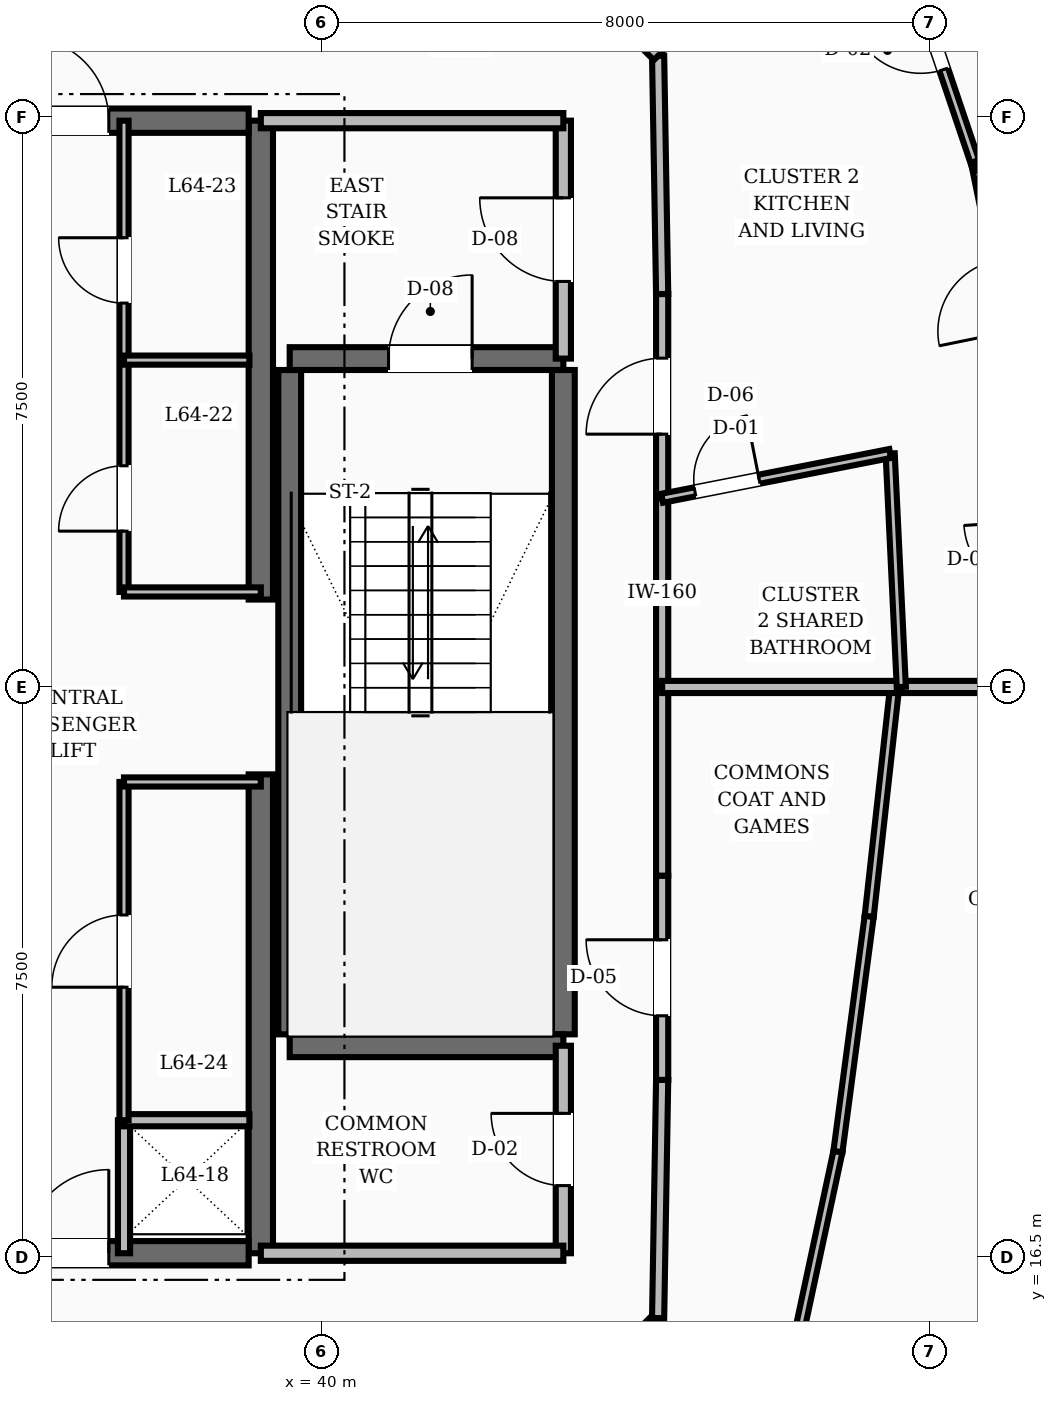
"""IFC4 building model, lengths in metres.
Left out: names, types, materials, properties, quantities, classifications, styles, units other than length and angle.
Written with IfcOpenShell. Run it as: python <this file> out.ifc"""

import sys

from ifc_helpers import new_model, si_unit, direction, frame, frame_2d, origin, place, context, subcontext, project, spatial, rectangle, extrude, element, fill, save


model = new_model("IFC4")
c1 = context("Model", 3, precision=1e-05, world=origin(), true_north=direction((0.0, 1.0)))
c2 = subcontext(c1, "Body", "Model", "MODEL_VIEW")
j1 = project(units=[si_unit("LENGTHUNIT", "METRE"), si_unit("PLANEANGLEUNIT", "RADIAN")], contexts=[c1])
p1 = place(None, origin())
s1 = spatial("IfcSite", under=j1, at=p1, CompositionType="ELEMENT")
p2 = place(p1, origin())
s2 = spatial("IfcBuilding", under=s1, at=p2, CompositionType="ELEMENT")
p3 = place(p2, frame((0.0, 0.0, 247.2)))
s3 = spatial("IfcBuildingStorey", under=s2, at=p3, CompositionType="ELEMENT", Elevation=247.2)
for number, where, z_axis, x_axis in (
    (1, (39.2, 16.55, 0.0), (0.0, 0.0, 1.0), (0.0, 1.0, 0.0)),
    (2, (39.2, 25.15, 0.0), (0.0, 0.0, 1.0), (0.0, 1.0, 0.0)),
):
    element("IfcWall", number, at=place(p3, frame(where, z_axis=z_axis, x_axis=x_axis)), inside=s3, PredefinedType="SHEAR", context=c2, shape_type="SweptSolid", body=[
        extrude(rectangle(XDim=6.3, YDim=0.32, at=frame_2d((3.15, 0.0))), origin(), (0.0, 0.0, 1.0), 3.6),
    ])
p4 = place(p3, frame((35.8, 16.55, 0.0), z_axis=(0.0, 0.0, 1.0), x_axis=(1.0, 0.0, 0.0)))
e3 = element("IfcWall", 3, at=p4, inside=s3, PredefinedType="SHEAR", context=c2, shape_type="SweptSolid", body=[
    extrude(rectangle(XDim=3.24, YDim=0.32, at=frame_2d((1.62, 0.0))), origin(), (0.0, 0.0, 1.0), 3.6),
])
p5 = place(p4, frame((0.3, 0.0, 0.0)))
e4 = element("IfcOpeningElement", 4, at=p5, cuts=e3, PredefinedType="OPENING", context=c2, shape_type="SweptSolid", body=[
    extrude(rectangle(XDim=1.1, YDim=2.1, at=frame_2d((0.55, 1.05))), frame((0.0, 0.17, 0.0), z_axis=(0.0, -1.0, 0.0), x_axis=(1.0, 0.0, 0.0)), (0.0, 0.0, 1.0), 0.34),
])
p6 = place(p3, frame((35.8, 31.45, 0.0), z_axis=(0.0, 0.0, 1.0), x_axis=(1.0, 0.0, 0.0)))
e5 = element("IfcWall", 5, at=p6, inside=s3, PredefinedType="SHEAR", context=c2, shape_type="SweptSolid", body=[
    extrude(rectangle(XDim=3.24, YDim=0.32, at=frame_2d((1.62, 0.0))), origin(), (0.0, 0.0, 1.0), 3.6),
])
p7 = place(p6, frame((0.3, 0.0, 0.0)))
e6 = element("IfcOpeningElement", 6, at=p7, cuts=e5, PredefinedType="OPENING", context=c2, shape_type="SweptSolid", body=[
    extrude(rectangle(XDim=1.1, YDim=2.1, at=frame_2d((0.55, 1.05))), frame((0.0, 0.17, 0.0), z_axis=(0.0, -1.0, 0.0), x_axis=(1.0, 0.0, 0.0)), (0.0, 0.0, 1.0), 0.34),
])
for number, where, z_axis, x_axis in (
    (7, (43.18, 19.43, 0.0), (0.0, 0.0, 1.0), (0.0, 1.0, 0.0)),
    (8, (39.58, 19.43, 0.0), (0.0, 0.0, 1.0), (0.0, 1.0, 0.0)),
):
    element("IfcWall", number, at=place(p3, frame(where, z_axis=z_axis, x_axis=x_axis)), inside=s3, PredefinedType="SHEAR", context=c2, shape_type="SweptSolid", body=[
        extrude(rectangle(XDim=8.74, YDim=0.3, at=frame_2d((4.37, 0.0))), origin(), (0.0, 0.0, 1.0), 3.6),
    ])
p8 = place(p3, frame((39.58, 19.28, 0.0), z_axis=(0.0, 0.0, 1.0), x_axis=(1.0, 0.0, 0.0)))
e9 = element("IfcWall", 9, at=p8, inside=s3, PredefinedType="SHEAR", context=c2, shape_type="SweptSolid", body=[
    extrude(rectangle(XDim=3.6, YDim=0.3, at=frame_2d((1.8, 0.0))), origin(), (0.0, 0.0, 1.0), 3.6),
])
p9 = place(p3, frame((39.58, 28.32, 0.0), z_axis=(0.0, 0.0, 1.0), x_axis=(1.0, 0.0, 0.0)))
e10 = element("IfcWall", 10, at=p9, inside=s3, PredefinedType="SHEAR", context=c2, shape_type="SweptSolid", body=[
    extrude(rectangle(XDim=3.6, YDim=0.3, at=frame_2d((1.8, 0.0))), origin(), (0.0, 0.0, 1.0), 3.6),
])
p10 = place(p9, frame((1.3, 0.0, 0.0)))
e11 = element("IfcOpeningElement", 11, at=p10, cuts=e10, PredefinedType="OPENING", context=c2, shape_type="SweptSolid", body=[
    extrude(rectangle(XDim=1.1, YDim=2.1, at=frame_2d((0.55, 1.05))), frame((0.0, 0.16, 0.0), z_axis=(0.0, -1.0, 0.0), x_axis=(1.0, 0.0, 0.0)), (0.0, 0.0, 1.0), 0.32),
])
p11 = place(p3, frame((43.18, 28.32, 0.0), z_axis=(0.0, 0.0, 1.0), x_axis=(0.0, 1.0, 0.0)))
e12 = element("IfcWall", 12, at=p11, inside=s3, PredefinedType="SOLIDWALL", context=c2, shape_type="SweptSolid", body=[
    extrude(rectangle(XDim=3.13, YDim=0.2, at=frame_2d((1.565, 0.0))), origin(), (0.0, 0.0, 1.0), 2.87),
])
p12 = place(p11, frame((1.015, 0.0, 0.0)))
e13 = element("IfcOpeningElement", 13, at=p12, cuts=e12, PredefinedType="OPENING", context=c2, shape_type="SweptSolid", body=[
    extrude(rectangle(XDim=1.1, YDim=2.1, at=frame_2d((0.55, 1.05))), frame((0.0, 0.11, 0.0), z_axis=(0.0, -1.0, 0.0), x_axis=(1.0, 0.0, 0.0)), (0.0, 0.0, 1.0), 0.22),
])
p13 = place(p3, frame((39.2, 31.45, 0.0), z_axis=(0.0, 0.0, 1.0), x_axis=(1.0, 0.0, 0.0)))
e14 = element("IfcWall", 14, at=p13, inside=s3, PredefinedType="SOLIDWALL", context=c2, shape_type="SweptSolid", body=[
    extrude(rectangle(XDim=3.98, YDim=0.2, at=frame_2d((1.99, 0.0))), origin(), (0.0, 0.0, 1.0), 2.87),
])
p14 = place(p3, frame((43.18, 16.55, 0.0), z_axis=(0.0, 0.0, 1.0), x_axis=(0.0, 1.0, 0.0)))
e15 = element("IfcWall", 15, at=p14, inside=s3, PredefinedType="SOLIDWALL", context=c2, shape_type="SweptSolid", body=[
    extrude(rectangle(XDim=2.73, YDim=0.2, at=frame_2d((1.365, 0.0))), origin(), (0.0, 0.0, 1.0), 2.87),
])
p15 = place(p14, frame((0.89, 0.0, 0.0)))
e16 = element("IfcOpeningElement", 16, at=p15, cuts=e15, PredefinedType="OPENING", context=c2, shape_type="SweptSolid", body=[
    extrude(rectangle(XDim=0.95, YDim=2.1, at=frame_2d((0.475, 1.05))), frame((0.0, 0.11, 0.0), z_axis=(0.0, -1.0, 0.0), x_axis=(1.0, 0.0, 0.0)), (0.0, 0.0, 1.0), 0.22),
])
p16 = place(p3, frame((39.2, 16.55, 0.0), z_axis=(0.0, 0.0, 1.0), x_axis=(1.0, 0.0, 0.0)))
e17 = element("IfcWall", 17, at=p16, inside=s3, PredefinedType="SOLIDWALL", context=c2, shape_type="SweptSolid", body=[
    extrude(rectangle(XDim=3.98, YDim=0.2, at=frame_2d((1.99, 0.0))), origin(), (0.0, 0.0, 1.0), 2.87),
])
p17 = place(p3, frame((37.4, 16.55, 0.0), z_axis=(0.0, 0.0, 1.0), x_axis=(0.0, 1.0, 0.0)))
e18 = element("IfcWall", 18, at=p17, inside=s3, PredefinedType="SOLIDWALL", context=c2, shape_type="SweptSolid", body=[
    extrude(rectangle(XDim=1.75, YDim=0.16, at=frame_2d((0.875, 0.0))), origin(), (0.0, 0.0, 1.0), 2.87),
])
p18 = place(p3, frame((37.4, 18.3, 0.0), z_axis=(0.0, 0.0, 1.0), x_axis=(1.0, 0.0, 0.0)))
e19 = element("IfcWall", 19, at=p18, inside=s3, PredefinedType="SOLIDWALL", context=c2, shape_type="SweptSolid", body=[
    extrude(rectangle(XDim=1.65, YDim=0.16, at=frame_2d((0.825, 0.0))), origin(), (0.0, 0.0, 1.0), 2.87),
])
p19 = place(p3, frame((37.4, 25.25, 0.0), z_axis=(0.0, 0.0, 1.0), x_axis=(0.0, 1.0, 0.0)))
e20 = element("IfcWall", 20, at=p19, inside=s3, PredefinedType="PARTITIONING", context=c2, shape_type="SweptSolid", body=[
    extrude(rectangle(XDim=6.2, YDim=0.12, at=frame_2d((3.1, 0.0))), origin(), (0.0, 0.0, 1.0), 2.87),
])
p20 = place(p19, frame((0.8, 0.0, 0.0)))
e21 = element("IfcOpeningElement", 21, at=p20, cuts=e20, PredefinedType="OPENING", context=c2, shape_type="SweptSolid", body=[
    extrude(rectangle(XDim=0.86, YDim=2.1, at=frame_2d((0.43, 1.05))), frame((0.0, 0.07, 0.0), z_axis=(0.0, -1.0, 0.0), x_axis=(1.0, 0.0, 0.0)), (0.0, 0.0, 1.0), 0.14),
])
p21 = place(p19, frame((3.8, 0.0, 0.0)))
e22 = element("IfcOpeningElement", 22, at=p21, cuts=e20, PredefinedType="OPENING", context=c2, shape_type="SweptSolid", body=[
    extrude(rectangle(XDim=0.86, YDim=2.1, at=frame_2d((0.43, 1.05))), frame((0.0, 0.07, 0.0), z_axis=(0.0, -1.0, 0.0), x_axis=(1.0, 0.0, 0.0)), (0.0, 0.0, 1.0), 0.14),
])
p22 = place(p3, frame((37.4, 25.25, 0.0), z_axis=(0.0, 0.0, 1.0), x_axis=(1.0, 0.0, 0.0)))
e23 = element("IfcWall", 23, at=p22, inside=s3, PredefinedType="PARTITIONING", context=c2, shape_type="SweptSolid", body=[
    extrude(rectangle(XDim=1.8, YDim=0.12, at=frame_2d((0.9, 0.0))), origin(), (0.0, 0.0, 1.0), 2.87),
])
p23 = place(p3, frame((37.4, 18.3, 0.0), z_axis=(0.0, 0.0, 1.0), x_axis=(0.0, 1.0, 0.0)))
e24 = element("IfcWall", 24, at=p23, inside=s3, PredefinedType="PARTITIONING", context=c2, shape_type="SweptSolid", body=[
    extrude(rectangle(XDim=4.45, YDim=0.12, at=frame_2d((2.225, 0.0))), origin(), (0.0, 0.0, 1.0), 2.87),
])
p24 = place(p23, frame((1.75, 0.0, 0.0)))
e25 = element("IfcOpeningElement", 25, at=p24, cuts=e24, PredefinedType="OPENING", context=c2, shape_type="SweptSolid", body=[
    extrude(rectangle(XDim=0.95, YDim=2.1, at=frame_2d((0.475, 1.05))), frame((0.0, 0.07, 0.0), z_axis=(0.0, -1.0, 0.0), x_axis=(1.0, 0.0, 0.0)), (0.0, 0.0, 1.0), 0.14),
])
p25 = place(p3, frame((37.4, 22.75, 0.0), z_axis=(0.0, 0.0, 1.0), x_axis=(1.0, 0.0, 0.0)))
e26 = element("IfcWall", 26, at=p25, inside=s3, PredefinedType="PARTITIONING", context=c2, shape_type="SweptSolid", body=[
    extrude(rectangle(XDim=1.8, YDim=0.12, at=frame_2d((0.9, 0.0))), origin(), (0.0, 0.0, 1.0), 2.87),
])
p26 = place(p3, frame((37.4, 28.3, 0.0), z_axis=(0.0, 0.0, 1.0), x_axis=(1.0, 0.0, 0.0)))
e27 = element("IfcWall", 27, at=p26, inside=s3, PredefinedType="PARTITIONING", context=c2, shape_type="SweptSolid", body=[
    extrude(rectangle(XDim=1.65, YDim=0.12, at=frame_2d((0.825, 0.0))), origin(), (0.0, 0.0, 1.0), 2.87),
])
p27 = place(p3, frame((44.48, 24.0, 0.0), z_axis=(0.0, 0.0, 1.0), x_axis=(0.0, 1.0, 0.0)))
e28 = element("IfcWall", 28, at=p27, inside=s3, PredefinedType="SOLIDWALL", context=c2, shape_type="SweptSolid", body=[
    extrude(rectangle(XDim=2.482, YDim=0.16, at=frame_2d((1.241, 0.0))), origin(), (0.0, 0.0, 1.0), 2.87),
])
p28 = place(p3, frame((44.48, 26.482, 0.0), z_axis=(0.0, 0.0, 1.0), x_axis=(0.0, 1.0, 0.0)))
e29 = element("IfcWall", 29, at=p28, inside=s3, PredefinedType="SOLIDWALL", context=c2, shape_type="SweptSolid", body=[
    extrude(rectangle(XDim=2.687, YDim=0.16, at=frame_2d((1.344, 0.0))), origin(), (0.0, 0.0, 1.0), 2.87),
])
p29 = place(p28, frame((0.844, 0.0, 0.0)))
e30 = element("IfcOpeningElement", 30, at=p29, cuts=e29, PredefinedType="OPENING", context=c2, shape_type="SweptSolid", body=[
    extrude(rectangle(XDim=1.0, YDim=2.1, at=frame_2d((0.5, 1.05))), frame((0.0, 0.09, 0.0), z_axis=(0.0, -1.0, 0.0), x_axis=(1.0, 0.0, 0.0)), (0.0, 0.0, 1.0), 0.18),
])
p30 = place(p3, frame((44.48, 29.169, 0.0), z_axis=(0.0, 0.0, 1.0), x_axis=(-0.016981035134, 0.999855811828, 0.0)))
e31 = element("IfcWall", 31, at=p30, inside=s3, PredefinedType="SOLIDWALL", context=c2, shape_type="SweptSolid", body=[
    extrude(rectangle(XDim=3.134, YDim=0.16, at=frame_2d((1.567, 0.0))), origin(), (0.0, 0.0, 1.0), 2.87),
])
for number, where, z_axis, x_axis in (
    (32, (44.427, 32.303, 0.0), (0.0, 0.0, 1.0), (-0.707, 0.707, 0.0)),
    (33, (42.365, 13.635, 0.0), (0.0, 0.0, 1.0), (0.707, 0.707, 0.0)),
):
    element("IfcWall", number, at=place(p3, frame(where, z_axis=z_axis, x_axis=x_axis)), inside=s3, PredefinedType="SOLIDWALL", context=c2, shape_type="SweptSolid", body=[
        extrude(rectangle(XDim=2.916, YDim=0.16, at=frame_2d((1.458, 0.0))), origin(), (0.0, 0.0, 1.0), 2.87),
    ])
p31 = place(p3, frame((44.427, 15.697, 0.0), z_axis=(0.0, 0.0, 1.0), x_axis=(0.016981035134, 0.999855811828, 0.0)))
e34 = element("IfcWall", 34, at=p31, inside=s3, PredefinedType="SOLIDWALL", context=c2, shape_type="SweptSolid", body=[
    extrude(rectangle(XDim=3.134, YDim=0.16, at=frame_2d((1.567, 0.0))), origin(), (0.0, 0.0, 1.0), 2.87),
])
p32 = place(p3, frame((44.48, 18.831, 0.0), z_axis=(0.0, 0.0, 1.0), x_axis=(0.0, 1.0, 0.0)))
e35 = element("IfcWall", 35, at=p32, inside=s3, PredefinedType="SOLIDWALL", context=c2, shape_type="SweptSolid", body=[
    extrude(rectangle(XDim=2.687, YDim=0.16, at=frame_2d((1.344, 0.0))), origin(), (0.0, 0.0, 1.0), 2.87),
])
p33 = place(p32, frame((0.844, 0.0, 0.0)))
e36 = element("IfcOpeningElement", 36, at=p33, cuts=e35, PredefinedType="OPENING", context=c2, shape_type="SweptSolid", body=[
    extrude(rectangle(XDim=1.0, YDim=2.1, at=frame_2d((0.5, 1.05))), frame((0.0, 0.09, 0.0), z_axis=(0.0, -1.0, 0.0), x_axis=(1.0, 0.0, 0.0)), (0.0, 0.0, 1.0), 0.18),
])
p34 = place(p3, frame((44.48, 21.518, 0.0), z_axis=(0.0, 0.0, 1.0), x_axis=(0.0, 1.0, 0.0)))
e37 = element("IfcWall", 37, at=p34, inside=s3, PredefinedType="SOLIDWALL", context=c2, shape_type="SweptSolid", body=[
    extrude(rectangle(XDim=2.482, YDim=0.16, at=frame_2d((1.241, 0.0))), origin(), (0.0, 0.0, 1.0), 2.87),
])
p35 = place(p3, frame((46.09, 14.607, 0.0), z_axis=(0.0, 0.0, 1.0), x_axis=(0.20950424044, 0.977807738381, 0.0)))
e38 = element("IfcWall", 38, at=p35, inside=s3, PredefinedType="PARTITIONING", context=c2, shape_type="SweptSolid", body=[
    extrude(rectangle(XDim=3.355, YDim=0.12, at=frame_2d((1.677, 0.0))), origin(), (0.0, 0.0, 1.0), 2.87),
])
p36 = place(p3, frame((46.792, 17.887, 0.0), z_axis=(0.0, 0.0, 1.0), x_axis=(0.131795047745, 0.991276987219, 0.0)))
e39 = element("IfcWall", 39, at=p36, inside=s3, PredefinedType="PARTITIONING", context=c2, shape_type="SweptSolid", body=[
    extrude(rectangle(XDim=3.123, YDim=0.12, at=frame_2d((1.562, 0.0))), origin(), (0.0, 0.0, 1.0), 2.87),
])
p37 = place(p3, frame((47.204, 20.983, 0.0), z_axis=(0.0, 0.0, 1.0), x_axis=(0.110281438, 0.993900399654, 0.0)))
e40 = element("IfcWall", 40, at=p37, inside=s3, PredefinedType="PARTITIONING", context=c2, shape_type="SweptSolid", body=[
    extrude(rectangle(XDim=3.035, YDim=0.12, at=frame_2d((1.518, 0.0))), origin(), (0.0, 0.0, 1.0), 2.87),
])
p38 = place(p3, frame((44.48, 24.0, 0.0), z_axis=(0.0, 0.0, 1.0), x_axis=(1.0, 0.0, 0.0)))
e41 = element("IfcWall", 41, at=p38, inside=s3, PredefinedType="SOLIDWALL", context=c2, shape_type="SweptSolid", body=[
    extrude(rectangle(XDim=8.69, YDim=0.16, at=frame_2d((4.345, 0.0))), origin(), (0.0, 0.0, 1.0), 2.87),
])
p39 = place(p3, frame((47.626, 24.0, 0.0), z_axis=(0.0, 0.0, 1.0), x_axis=(-0.047719818528, 0.998860760527, 0.0)))
e42 = element("IfcWall", 42, at=p39, inside=s3, PredefinedType="PARTITIONING", context=c2, shape_type="SweptSolid", body=[
    extrude(rectangle(XDim=3.075, YDim=0.12, at=frame_2d((1.537, 0.0))), origin(), (0.0, 0.0, 1.0), 2.87),
])
p40 = place(p3, frame((44.48, 26.482, 0.0), z_axis=(0.0, 0.0, 1.0), x_axis=(0.981268776343, 0.192643682935, 0.0)))
e43 = element("IfcWall", 43, at=p40, inside=s3, PredefinedType="PARTITIONING", context=c2, shape_type="SweptSolid", body=[
    extrude(rectangle(XDim=3.057, YDim=0.12, at=frame_2d((1.528, 0.0))), origin(), (0.0, 0.0, 1.0), 2.87),
])
p41 = place(p40, frame((0.44, 0.0, 0.0)))
e44 = element("IfcOpeningElement", 44, at=p41, cuts=e43, PredefinedType="OPENING", context=c2, shape_type="SweptSolid", body=[
    extrude(rectangle(XDim=0.86, YDim=2.1, at=frame_2d((0.43, 1.05))), frame((0.0, 0.07, 0.0), z_axis=(0.0, -1.0, 0.0), x_axis=(1.0, 0.0, 0.0)), (0.0, 0.0, 1.0), 0.14),
])
p42 = place(p3, frame((49.312, 27.431, 0.0), z_axis=(0.0, 0.0, 1.0), x_axis=(-0.20026371196, 0.979742030165, 0.0)))
e45 = element("IfcWall", 45, at=p42, inside=s3, PredefinedType="PARTITIONING", context=c2, shape_type="SweptSolid", body=[
    extrude(rectangle(XDim=3.496, YDim=0.12, at=frame_2d((1.748, 0.0))), origin(), (0.0, 0.0, 1.0), 2.87),
])
p43 = place(p42, frame((1.273, 0.0, 0.0)))
e46 = element("IfcOpeningElement", 46, at=p43, cuts=e45, PredefinedType="OPENING", context=c2, shape_type="SweptSolid", body=[
    extrude(rectangle(XDim=0.95, YDim=2.1, at=frame_2d((0.475, 1.05))), frame((0.0, 0.07, 0.0), z_axis=(0.0, -1.0, 0.0), x_axis=(1.0, 0.0, 0.0)), (0.0, 0.0, 1.0), 0.14),
])
p44 = place(p3, frame((48.612, 30.857, 0.0), z_axis=(0.0, 0.0, 1.0), x_axis=(-0.320106009533, 0.947381730171, 0.0)))
e47 = element("IfcWall", 47, at=p44, inside=s3, PredefinedType="PARTITIONING", context=c2, shape_type="SweptSolid", body=[
    extrude(rectangle(XDim=3.624, YDim=0.12, at=frame_2d((1.812, 0.0))), origin(), (0.0, 0.0, 1.0), 2.87),
])
p45 = place(p44, frame((1.337, 0.0, 0.0)))
e48 = element("IfcOpeningElement", 48, at=p45, cuts=e47, PredefinedType="OPENING", context=c2, shape_type="SweptSolid", body=[
    extrude(rectangle(XDim=0.95, YDim=2.1, at=frame_2d((0.475, 1.05))), frame((0.0, 0.07, 0.0), z_axis=(0.0, -1.0, 0.0), x_axis=(1.0, 0.0, 0.0)), (0.0, 0.0, 1.0), 0.14),
])
p46 = place(p3, frame((48.612, 30.857, 0.0), z_axis=(0.0, 0.0, 1.0), x_axis=(0.925818055763, 0.377969479752, 0.0)))
e49 = element("IfcWall", 49, at=p46, inside=s3, PredefinedType="PARTITIONING", context=c2, shape_type="SweptSolid", body=[
    extrude(rectangle(XDim=3.182, YDim=0.12, at=frame_2d((1.591, 0.0))), origin(), (0.0, 0.0, 1.0), 2.87),
])
p47 = place(p10, origin())
e50 = element("IfcDoor", 50, at=p47, inside=s3, OperationType="SINGLE_SWING_RIGHT", PredefinedType="DOOR", context=c2, shape_type="SweptSolid", body=[
    extrude(rectangle(XDim=1.1, YDim=2.1, at=frame_2d((0.55, 1.05))), frame((0.0, 0.025, 0.0), z_axis=(0.0, -1.0, 0.0), x_axis=(1.0, 0.0, 0.0)), (0.0, 0.0, 1.0), 0.05),
])
fill(e11, e50)
p48 = place(p12, origin())
e51 = element("IfcDoor", 51, at=p48, inside=s3, OperationType="SINGLE_SWING_RIGHT", PredefinedType="DOOR", context=c2, shape_type="SweptSolid", body=[
    extrude(rectangle(XDim=1.1, YDim=2.1, at=frame_2d((0.55, 1.05))), frame((0.0, 0.025, 0.0), z_axis=(0.0, -1.0, 0.0), x_axis=(1.0, 0.0, 0.0)), (0.0, 0.0, 1.0), 0.05),
])
fill(e13, e51)
p49 = place(p15, origin())
e52 = element("IfcDoor", 52, at=p49, inside=s3, OperationType="SINGLE_SWING_RIGHT", PredefinedType="DOOR", context=c2, shape_type="SweptSolid", body=[
    extrude(rectangle(XDim=0.95, YDim=2.1, at=frame_2d((0.475, 1.05))), frame((0.0, 0.025, 0.0), z_axis=(0.0, -1.0, 0.0), x_axis=(1.0, 0.0, 0.0)), (0.0, 0.0, 1.0), 0.05),
])
fill(e16, e52)
p50 = place(p7, origin())
e53 = element("IfcDoor", 53, at=p50, inside=s3, OperationType="SINGLE_SWING_LEFT", PredefinedType="DOOR", context=c2, shape_type="SweptSolid", body=[
    extrude(rectangle(XDim=1.1, YDim=2.1, at=frame_2d((0.55, 1.05))), frame((0.0, 0.025, 0.0), z_axis=(0.0, -1.0, 0.0), x_axis=(1.0, 0.0, 0.0)), (0.0, 0.0, 1.0), 0.05),
])
fill(e6, e53)
p51 = place(p5, origin())
e54 = element("IfcDoor", 54, at=p51, inside=s3, OperationType="SINGLE_SWING_RIGHT", PredefinedType="DOOR", context=c2, shape_type="SweptSolid", body=[
    extrude(rectangle(XDim=1.1, YDim=2.1, at=frame_2d((0.55, 1.05))), frame((0.0, 0.025, 0.0), z_axis=(0.0, -1.0, 0.0), x_axis=(1.0, 0.0, 0.0)), (0.0, 0.0, 1.0), 0.05),
])
fill(e4, e54)
p52 = place(p20, origin())
e55 = element("IfcDoor", 55, at=p52, inside=s3, OperationType="SINGLE_SWING_LEFT", PredefinedType="DOOR", context=c2, shape_type="SweptSolid", body=[
    extrude(rectangle(XDim=0.86, YDim=2.1, at=frame_2d((0.43, 1.05))), frame((0.0, 0.025, 0.0), z_axis=(0.0, -1.0, 0.0), x_axis=(1.0, 0.0, 0.0)), (0.0, 0.0, 1.0), 0.05),
])
fill(e21, e55)
p53 = place(p21, origin())
e56 = element("IfcDoor", 56, at=p53, inside=s3, OperationType="SINGLE_SWING_RIGHT", PredefinedType="DOOR", context=c2, shape_type="SweptSolid", body=[
    extrude(rectangle(XDim=0.86, YDim=2.1, at=frame_2d((0.43, 1.05))), frame((0.0, 0.025, 0.0), z_axis=(0.0, -1.0, 0.0), x_axis=(1.0, 0.0, 0.0)), (0.0, 0.0, 1.0), 0.05),
])
fill(e22, e56)
p54 = place(p24, origin())
e57 = element("IfcDoor", 57, at=p54, inside=s3, OperationType="SINGLE_SWING_LEFT", PredefinedType="DOOR", context=c2, shape_type="SweptSolid", body=[
    extrude(rectangle(XDim=0.95, YDim=2.1, at=frame_2d((0.475, 1.05))), frame((0.0, 0.025, 0.0), z_axis=(0.0, -1.0, 0.0), x_axis=(1.0, 0.0, 0.0)), (0.0, 0.0, 1.0), 0.05),
])
fill(e25, e57)
p55 = place(p33, origin())
e58 = element("IfcDoor", 58, at=p55, inside=s3, OperationType="SINGLE_SWING_RIGHT", PredefinedType="DOOR", context=c2, shape_type="SweptSolid", body=[
    extrude(rectangle(XDim=1.0, YDim=2.1, at=frame_2d((0.5, 1.05))), frame((0.0, 0.025, 0.0), z_axis=(0.0, -1.0, 0.0), x_axis=(1.0, 0.0, 0.0)), (0.0, 0.0, 1.0), 0.05),
])
fill(e36, e58)
p56 = place(p41, origin())
e59 = element("IfcDoor", 59, at=p56, inside=s3, OperationType="SINGLE_SWING_RIGHT", PredefinedType="DOOR", context=c2, shape_type="SweptSolid", body=[
    extrude(rectangle(XDim=0.86, YDim=2.1, at=frame_2d((0.43, 1.05))), frame((0.0, 0.025, 0.0), z_axis=(0.0, -1.0, 0.0), x_axis=(1.0, 0.0, 0.0)), (0.0, 0.0, 1.0), 0.05),
])
fill(e44, e59)
p57 = place(p29, origin())
e60 = element("IfcDoor", 60, at=p57, inside=s3, OperationType="SINGLE_SWING_LEFT", PredefinedType="DOOR", context=c2, shape_type="SweptSolid", body=[
    extrude(rectangle(XDim=1.0, YDim=2.1, at=frame_2d((0.5, 1.05))), frame((0.0, 0.025, 0.0), z_axis=(0.0, -1.0, 0.0), x_axis=(1.0, 0.0, 0.0)), (0.0, 0.0, 1.0), 0.05),
])
fill(e30, e60)
p58 = place(p45, origin())
e61 = element("IfcDoor", 61, at=p58, inside=s3, OperationType="SINGLE_SWING_RIGHT", PredefinedType="DOOR", context=c2, shape_type="SweptSolid", body=[
    extrude(rectangle(XDim=0.95, YDim=2.1, at=frame_2d((0.475, 1.05))), frame((0.0, 0.025, 0.0), z_axis=(0.0, -1.0, 0.0), x_axis=(1.0, 0.0, 0.0)), (0.0, 0.0, 1.0), 0.05),
])
fill(e48, e61)
save(model, sys.argv[1])
